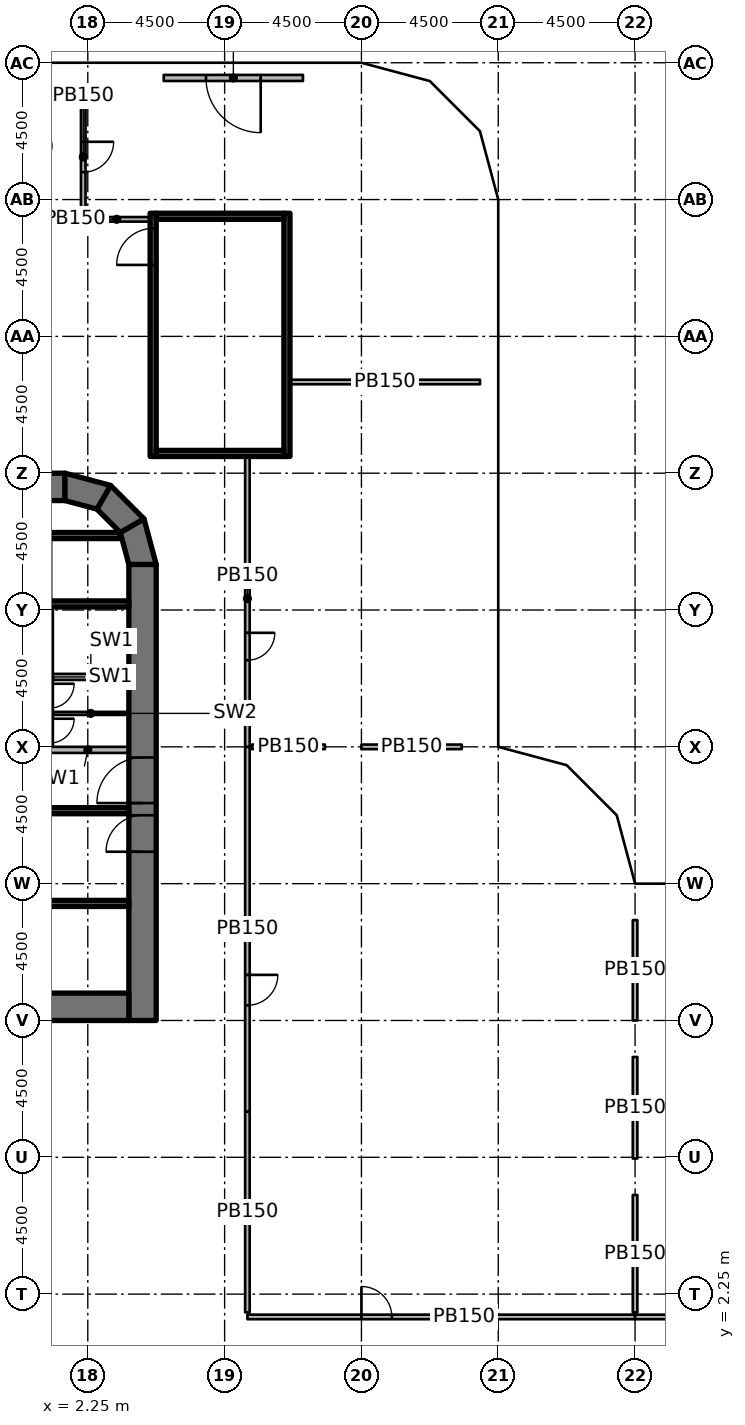
"""IFC4 building model, lengths in metres.
Left out: names, types, materials, properties, quantities, classifications, styles, units other than length and angle.
Written with IfcOpenShell. Run it as: python <this file> out.ifc"""

import sys

from ifc_helpers import new_model, si_unit, direction, frame, frame_2d, origin, origin_2d, place, context, subcontext, project, spatial, polyline, rectangle, outline, extrude, element, fill, save


model = new_model("IFC4")
c1 = context("Model", 3, precision=1e-05, world=origin(), true_north=direction((0.0, 1.0)))
c2 = subcontext(c1, "Body", "Model", "MODEL_VIEW")
j1 = project(units=[si_unit("LENGTHUNIT", "METRE"), si_unit("PLANEANGLEUNIT", "RADIAN")], contexts=[c1])
p1 = place(None, origin())
s1 = spatial("IfcSite", under=j1, at=p1, CompositionType="ELEMENT")
p2 = place(p1, origin())
s2 = spatial("IfcBuilding", under=s1, at=p2, CompositionType="ELEMENT")
p3 = place(p2, frame((0.0, 0.0, 17.0)))
s3 = spatial("IfcBuildingStorey", under=s2, at=p3, CompositionType="ELEMENT", Elevation=17.0)
for number, where, z_axis, x_axis in (
    (1, (2.25, 33.11, 0.0), (0.0, 0.0, 1.0), (1.0, 0.0, 0.0)),
    (2, (2.25, 42.15, 0.0), (0.0, 0.0, 1.0), (1.0, 0.0, 0.0)),
    (3, (6.25, 6.25, 0.0), (0.0, 0.0, 1.0), (1.0, 0.0, 0.0)),
    (4, (6.25, 10.75, 0.0), (0.0, 0.0, 1.0), (1.0, 0.0, 0.0)),
    (5, (6.25, 15.75, 0.0), (0.0, 0.0, 1.0), (1.0, 0.0, 0.0)),
    (6, (6.25, 20.25, 0.0), (0.0, 0.0, 1.0), (1.0, 0.0, 0.0)),
    (7, (6.25, 24.65, 0.0), (0.0, 0.0, 1.0), (1.0, 0.0, 0.0)),
    (8, (6.25, 26.7, 0.0), (0.0, 0.0, 1.0), (1.0, 0.0, 0.0)),
    (9, (10.75, 6.25, 0.0), (0.0, 0.0, 1.0), (1.0, 0.0, 0.0)),
    (10, (10.65, 15.15, 0.0), (0.0, 0.0, 1.0), (1.0, 0.0, 0.0)),
    (11, (10.65, 20.25, 0.0), (0.0, 0.0, 1.0), (1.0, 0.0, 0.0)),
    (12, (10.47, 33.75, 0.0), (0.0, 0.0, 1.0), (1.0, 0.0, 0.0)),
    (13, (15.75, 6.25, 0.0), (0.0, 0.0, 1.0), (1.0, 0.0, 0.0)),
    (14, (15.15, 10.65, 0.0), (0.0, 0.0, 1.0), (1.0, 0.0, 0.0)),
    (15, (15.15, 19.65, 0.0), (0.0, 0.0, 1.0), (1.0, 0.0, 0.0)),
    (16, (15.15, 29.25, 0.0), (0.0, 0.0, 1.0), (1.0, 0.0, 0.0)),
    (17, (20.25, 6.11, 0.0), (0.0, 0.0, 1.0), (1.0, 0.0, 0.0)),
    (18, (20.25, 10.65, 0.0), (0.0, 0.0, 1.0), (1.0, 0.0, 0.0)),
    (19, (19.65, 15.15, 0.0), (0.0, 0.0, 1.0), (1.0, 0.0, 0.0)),
):
    element("IfcColumn", number, at=place(p3, frame(where, z_axis=z_axis, x_axis=x_axis)), inside=s3, PredefinedType="COLUMN", context=c2, shape_type="SweptSolid", body=[
        extrude(rectangle(XDim=1.2, YDim=1.2, at=origin_2d()), origin(), (0.0, 0.0, 1.0), 4.55),
    ])
p4 = place(p3, frame((4.05, 11.25, 0.0), z_axis=(0.0, 0.0, 1.0), x_axis=(0.0, 1.0, 0.0)))
e20 = element("IfcWall", 20, at=p4, inside=s3, PredefinedType="SHEAR", context=c2, shape_type="SweptSolid", body=[
    extrude(rectangle(XDim=15.0, YDim=0.9, at=frame_2d((7.5, 0.0))), origin(), (0.0, 0.0, 1.0), 5.0),
])
p5 = place(p4, frame((7.15, 0.0, 0.0)))
e21 = element("IfcOpeningElement", 21, at=p5, cuts=e20, PredefinedType="OPENING", context=c2, shape_type="SweptSolid", body=[
    extrude(rectangle(XDim=1.5, YDim=2.3, at=frame_2d((0.75, 1.15))), frame((0.0, 0.46, 0.0), z_axis=(0.0, -1.0, 0.0), x_axis=(1.0, 0.0, 0.0)), (0.0, 0.0, 1.0), 0.92),
])
p6 = place(p4, frame((5.55, 0.0, 0.0)))
e22 = element("IfcOpeningElement", 22, at=p6, cuts=e20, PredefinedType="OPENING", context=c2, shape_type="SweptSolid", body=[
    extrude(rectangle(XDim=1.2, YDim=2.1, at=frame_2d((0.6, 1.05))), frame((0.0, 0.46, 0.0), z_axis=(0.0, -1.0, 0.0), x_axis=(1.0, 0.0, 0.0)), (0.0, 0.0, 1.0), 0.92),
])
p7 = place(p3, frame((-3.6, 11.7, 0.0), z_axis=(0.0, 0.0, 1.0), x_axis=(1.0, 0.0, 0.0)))
e23 = element("IfcWall", 23, at=p7, inside=s3, PredefinedType="SHEAR", context=c2, shape_type="SweptSolid", body=[
    extrude(rectangle(XDim=7.2, YDim=0.9, at=frame_2d((3.6, 0.0))), origin(), (0.0, 0.0, 1.0), 5.0),
])
p8 = place(p3, frame((-1.5, 28.8, 0.0), z_axis=(0.0, 0.0, 1.0), x_axis=(1.0, 0.0, 0.0)))
e24 = element("IfcWall", 24, at=p8, inside=s3, PredefinedType="SHEAR", context=c2, shape_type="SweptSolid", body=[
    extrude(rectangle(XDim=3.0, YDim=0.9, at=frame_2d((1.5, 0.0))), origin(), (0.0, 0.0, 1.0), 5.0),
])
p9 = place(p3, origin())
e25 = element("IfcWall", 25, at=p9, inside=s3, PredefinedType="SHEAR", context=c2, shape_type="SweptSolid", body=[
    extrude(outline(polyline([(4.5, 26.25), (4.098, 27.75), (3.319, 27.3), (3.6, 26.25), (4.5, 26.25)])), origin(), (0.0, 0.0, 1.0), 5.0),
])
p10 = place(p3, origin())
e26 = element("IfcWall", 26, at=p10, inside=s3, PredefinedType="SHEAR", context=c2, shape_type="SweptSolid", body=[
    extrude(outline(polyline([(4.098, 27.75), (3.0, 28.848), (2.55, 28.069), (3.319, 27.3), (4.098, 27.75)])), origin(), (0.0, 0.0, 1.0), 5.0),
])
p11 = place(p3, origin())
e27 = element("IfcWall", 27, at=p11, inside=s3, PredefinedType="SHEAR", context=c2, shape_type="SweptSolid", body=[
    extrude(outline(polyline([(3.0, 28.848), (1.5, 29.25), (1.5, 28.35), (2.55, 28.069), (3.0, 28.848)])), origin(), (0.0, 0.0, 1.0), 5.0),
])
p12 = place(p3, frame((9.327, 42.25, 0.0), z_axis=(0.0, 0.0, 1.0), x_axis=(-1.0, 0.0, 0.0)))
e28 = element("IfcWall", 28, at=p12, inside=s3, PredefinedType="SOLIDWALL", context=c2, shape_type="SweptSolid", body=[
    extrude(rectangle(XDim=4.58, YDim=0.2, at=frame_2d((2.29, 0.0))), origin(), (0.0, 0.0, 1.0), 4.55),
])
p13 = place(p12, frame((1.39, 0.0, 0.0)))
e29 = element("IfcOpeningElement", 29, at=p13, cuts=e28, PredefinedType="OPENING", context=c2, shape_type="SweptSolid", body=[
    extrude(rectangle(XDim=1.8, YDim=2.4, at=frame_2d((0.9, 1.2))), frame((0.0, 0.11, 0.0), z_axis=(0.0, -1.0, 0.0), x_axis=(1.0, 0.0, 0.0)), (0.0, 0.0, 1.0), 0.22),
])
p14 = place(p3, frame((-3.6, 24.95, 0.0), z_axis=(0.0, 0.0, 1.0), x_axis=(1.0, 0.0, 0.0)))
e30 = element("IfcWall", 30, at=p14, inside=s3, PredefinedType="SHEAR", context=c2, shape_type="SweptSolid", body=[
    extrude(rectangle(XDim=7.2, YDim=0.2, at=frame_2d((3.6, 0.0))), origin(), (0.0, 0.0, 1.0), 4.55),
])
p15 = place(p3, origin())
e31 = element("IfcWall", 31, at=p15, inside=s3, PredefinedType="SHEAR", context=c2, shape_type="SweptSolid", body=[
    extrude(outline(polyline([(1.0, 27.1), (3.341, 27.1), (3.291, 27.284), (3.275, 27.3), (1.0, 27.3), (1.0, 27.1)])), origin(), (0.0, 0.0, 1.0), 4.55),
])
for number, where, z_axis, x_axis in (
    (32, (-3.6, 18.15, 0.0), (0.0, 0.0, 1.0), (1.0, 0.0, 0.0)),
    (33, (-3.6, 15.1, 0.0), (0.0, 0.0, 1.0), (1.0, 0.0, 0.0)),
):
    element("IfcWall", number, at=place(p3, frame(where, z_axis=z_axis, x_axis=x_axis)), inside=s3, PredefinedType="SHEAR", context=c2, shape_type="SweptSolid", body=[
        extrude(rectangle(XDim=7.2, YDim=0.2, at=frame_2d((3.6, 0.0))), origin(), (0.0, 0.0, 1.0), 4.55),
    ])
p16 = place(p3, frame((0.9, 20.15, 0.0), z_axis=(0.0, 0.0, 1.0), x_axis=(1.0, 0.0, 0.0)))
e34 = element("IfcWall", 34, at=p16, inside=s3, PredefinedType="PARTITIONING", context=c2, shape_type="SweptSolid", body=[
    extrude(rectangle(XDim=2.7, YDim=0.2, at=frame_2d((1.35, 0.0))), origin(), (0.0, 0.0, 1.0), 4.55),
])
p17 = place(p3, frame((1.1, 22.55, 0.0), z_axis=(0.0, 0.0, 1.0), x_axis=(1.0, 0.0, 0.0)))
e35 = element("IfcWall", 35, at=p17, inside=s3, PredefinedType="PARTITIONING", context=c2, shape_type="SweptSolid", body=[
    extrude(rectangle(XDim=2.5, YDim=0.2, at=frame_2d((1.25, 0.0))), origin(), (0.0, 0.0, 1.0), 4.55),
])
p18 = place(p3, frame((1.1, 21.35, 0.0), z_axis=(0.0, 0.0, 1.0), x_axis=(1.0, 0.0, 0.0)))
e36 = element("IfcWall", 36, at=p18, inside=s3, PredefinedType="PARTITIONING", context=c2, shape_type="SweptSolid", body=[
    extrude(rectangle(XDim=2.5, YDim=0.1, at=frame_2d((1.25, 0.0))), origin(), (0.0, 0.0, 1.0), 4.55),
])
p19 = place(p3, frame((4.4, 29.8, 0.0), z_axis=(0.0, 0.0, 1.0), x_axis=(0.0, 1.0, 0.0)))
e37 = element("IfcWall", 37, at=p19, inside=s3, PredefinedType="SHEAR", context=c2, shape_type="SweptSolid", body=[
    extrude(rectangle(XDim=8.0, YDim=0.2, at=frame_2d((4.0, 0.0))), origin(), (0.0, 0.0, 1.0), 4.55),
])
p20 = place(p19, frame((6.3, 0.0, 0.0)))
e38 = element("IfcOpeningElement", 38, at=p20, cuts=e37, PredefinedType="OPENING", context=c2, shape_type="SweptSolid", body=[
    extrude(rectangle(XDim=1.2, YDim=2.1, at=frame_2d((0.6, 1.05))), frame((0.0, 0.11, 0.0), z_axis=(0.0, -1.0, 0.0), x_axis=(1.0, 0.0, 0.0)), (0.0, 0.0, 1.0), 0.22),
])
p21 = place(p3, frame((8.8, 29.8, 0.0), z_axis=(0.0, 0.0, 1.0), x_axis=(0.0, 1.0, 0.0)))
e39 = element("IfcWall", 39, at=p21, inside=s3, PredefinedType="SHEAR", context=c2, shape_type="SweptSolid", body=[
    extrude(rectangle(XDim=8.0, YDim=0.2, at=frame_2d((4.0, 0.0))), origin(), (0.0, 0.0, 1.0), 4.55),
])
for number, where, z_axis, x_axis in (
    (40, (4.5, 29.9, 0.0), (0.0, 0.0, 1.0), (1.0, 0.0, 0.0)),
    (41, (4.5, 37.7, 0.0), (0.0, 0.0, 1.0), (1.0, 0.0, 0.0)),
):
    element("IfcWall", number, at=place(p3, frame(where, z_axis=z_axis, x_axis=x_axis)), inside=s3, PredefinedType="SHEAR", context=c2, shape_type="SweptSolid", body=[
        extrude(rectangle(XDim=4.2, YDim=0.2, at=frame_2d((2.1, 0.0))), origin(), (0.0, 0.0, 1.0), 4.55),
    ])
p22 = place(p3, frame((2.1, 37.6, 0.0), z_axis=(0.0, 0.0, 1.0), x_axis=(1.0, 0.0, 0.0)))
e42 = element("IfcWall", 42, at=p22, inside=s3, PredefinedType="PARTITIONING", context=c2, shape_type="SweptSolid", body=[
    extrude(rectangle(XDim=2.2, YDim=0.15, at=frame_2d((1.1, 0.0))), origin(), (0.0, 0.0, 1.0), 4.55),
])
p23 = place(p3, frame((7.5, 20.25, 0.0), z_axis=(0.0, 0.0, 1.0), x_axis=(0.0, -1.0, 0.0)))
e43 = element("IfcWall", 43, at=p23, inside=s3, PredefinedType="PARTITIONING", context=c2, shape_type="SweptSolid", body=[
    extrude(rectangle(XDim=12.0, YDim=0.15, at=frame_2d((6.0, 0.0))), origin(), (0.0, 0.0, 1.0), 4.55),
])
p24 = place(p23, frame((7.5, 0.0, 0.0)))
e44 = element("IfcOpeningElement", 44, at=p24, cuts=e43, PredefinedType="OPENING", context=c2, shape_type="SweptSolid", body=[
    extrude(rectangle(XDim=1.0, YDim=2.1, at=frame_2d((0.5, 1.05))), frame((0.0, 0.085, 0.0), z_axis=(0.0, -1.0, 0.0), x_axis=(1.0, 0.0, 0.0)), (0.0, 0.0, 1.0), 0.17),
])
p25 = place(p3, frame((7.5, 30.0, 0.0), z_axis=(0.0, 0.0, 1.0), x_axis=(0.0, -1.0, 0.0)))
e45 = element("IfcWall", 45, at=p25, inside=s3, PredefinedType="PARTITIONING", context=c2, shape_type="SweptSolid", body=[
    extrude(rectangle(XDim=9.75, YDim=0.15, at=frame_2d((4.875, 0.0))), origin(), (0.0, 0.0, 1.0), 4.55),
])
p26 = place(p25, frame((6.0, 0.0, 0.0)))
e46 = element("IfcOpeningElement", 46, at=p26, cuts=e45, PredefinedType="OPENING", context=c2, shape_type="SweptSolid", body=[
    extrude(rectangle(XDim=0.9, YDim=2.1, at=frame_2d((0.45, 1.05))), frame((0.0, 0.085, 0.0), z_axis=(0.0, -1.0, 0.0), x_axis=(1.0, 0.0, 0.0)), (0.0, 0.0, 1.0), 0.17),
])
p27 = place(p3, frame((7.5, 1.5, 0.0), z_axis=(0.0, 0.0, 1.0), x_axis=(1.0, 0.0, 0.0)))
e47 = element("IfcWall", 47, at=p27, inside=s3, PredefinedType="PARTITIONING", context=c2, shape_type="SweptSolid", body=[
    extrude(rectangle(XDim=12.75, YDim=0.15, at=frame_2d((6.375, 0.0))), origin(), (0.0, 0.0, 1.0), 4.55),
])
p28 = place(p27, frame((3.75, 0.0, 0.0)))
e48 = element("IfcOpeningElement", 48, at=p28, cuts=e47, PredefinedType="OPENING", context=c2, shape_type="SweptSolid", body=[
    extrude(rectangle(XDim=1.0, YDim=2.1, at=frame_2d((0.5, 1.05))), frame((0.0, 0.085, 0.0), z_axis=(0.0, -1.0, 0.0), x_axis=(1.0, 0.0, 0.0)), (0.0, 0.0, 1.0), 0.17),
])
p29 = place(p3, frame((20.25, 1.5, 0.0), z_axis=(0.0, 0.0, 1.0), x_axis=(1.0, 0.0, 0.0)))
e49 = element("IfcWall", 49, at=p29, inside=s3, PredefinedType="PARTITIONING", context=c2, shape_type="SweptSolid", body=[
    extrude(rectangle(XDim=21.9, YDim=0.15, at=frame_2d((10.95, 0.0))), origin(), (0.0, 0.0, 1.0), 4.55),
])
p30 = place(p29, frame((10.8, 0.0, 0.0)))
e50 = element("IfcOpeningElement", 50, at=p30, cuts=e49, PredefinedType="OPENING", context=c2, shape_type="SweptSolid", body=[
    extrude(rectangle(XDim=0.9, YDim=2.1, at=frame_2d((0.45, 1.05))), frame((0.0, 0.085, 0.0), z_axis=(0.0, -1.0, 0.0), x_axis=(1.0, 0.0, 0.0)), (0.0, 0.0, 1.0), 0.17),
])
p31 = place(p3, frame((2.1, 41.55, 0.0), z_axis=(0.0, 0.0, 1.0), x_axis=(0.0, -1.0, 0.0)))
e51 = element("IfcWall", 51, at=p31, inside=s3, PredefinedType="PARTITIONING", context=c2, shape_type="SweptSolid", body=[
    extrude(rectangle(XDim=3.8, YDim=0.15, at=frame_2d((1.9, 0.0))), origin(), (0.0, 0.0, 1.0), 4.55),
])
p32 = place(p31, frame((1.4, 0.0, 0.0)))
e52 = element("IfcOpeningElement", 52, at=p32, cuts=e51, PredefinedType="OPENING", context=c2, shape_type="SweptSolid", body=[
    extrude(rectangle(XDim=1.0, YDim=2.1, at=frame_2d((0.5, 1.05))), frame((0.0, 0.085, 0.0), z_axis=(0.0, -1.0, 0.0), x_axis=(1.0, 0.0, 0.0)), (0.0, 0.0, 1.0), 0.17),
])
p33 = place(p3, frame((20.25, 14.55, 0.0), z_axis=(0.0, 0.0, 1.0), x_axis=(0.0, -1.0, 0.0)))
e53 = element("IfcWall", 53, at=p33, inside=s3, PredefinedType="PARTITIONING", context=c2, shape_type="SweptSolid", body=[
    extrude(rectangle(XDim=3.3, YDim=0.15, at=frame_2d((1.65, 0.0))), origin(), (0.0, 0.0, 1.0), 4.55),
])
p34 = place(p3, frame((20.25, 10.05, 0.0), z_axis=(0.0, 0.0, 1.0), x_axis=(0.0, -1.0, 0.0)))
e54 = element("IfcWall", 54, at=p34, inside=s3, PredefinedType="PARTITIONING", context=c2, shape_type="SweptSolid", body=[
    extrude(rectangle(XDim=3.34, YDim=0.15, at=frame_2d((1.67, 0.0))), origin(), (0.0, 0.0, 1.0), 4.55),
])
p35 = place(p3, frame((20.25, 5.51, 0.0), z_axis=(0.0, 0.0, 1.0), x_axis=(0.0, -1.0, 0.0)))
e55 = element("IfcWall", 55, at=p35, inside=s3, PredefinedType="PARTITIONING", context=c2, shape_type="SweptSolid", body=[
    extrude(rectangle(XDim=3.86, YDim=0.15, at=frame_2d((1.93, 0.0))), origin(), (0.0, 0.0, 1.0), 4.55),
])
p36 = place(p3, frame((7.65, 20.25, 0.0), z_axis=(0.0, 0.0, 1.0), x_axis=(1.0, 0.0, 0.0)))
e56 = element("IfcWall", 56, at=p36, inside=s3, PredefinedType="PARTITIONING", context=c2, shape_type="SweptSolid", body=[
    extrude(rectangle(XDim=2.4, YDim=0.15, at=frame_2d((1.2, 0.0))), origin(), (0.0, 0.0, 1.0), 4.55),
])
p37 = place(p3, frame((11.25, 20.25, 0.0), z_axis=(0.0, 0.0, 1.0), x_axis=(1.0, 0.0, 0.0)))
e57 = element("IfcWall", 57, at=p37, inside=s3, PredefinedType="PARTITIONING", context=c2, shape_type="SweptSolid", body=[
    extrude(rectangle(XDim=3.3, YDim=0.15, at=frame_2d((1.65, 0.0))), origin(), (0.0, 0.0, 1.0), 4.55),
])
p38 = place(p3, frame((7.5, 1.65, 0.0), z_axis=(0.0, 0.0, 1.0), x_axis=(0.0, 1.0, 0.0)))
e58 = element("IfcWall", 58, at=p38, inside=s3, PredefinedType="PARTITIONING", context=c2, shape_type="SweptSolid", body=[
    extrude(rectangle(XDim=6.6, YDim=0.15, at=frame_2d((3.3, 0.0))), origin(), (0.0, 0.0, 1.0), 4.55),
])
p39 = place(p3, frame((8.9, 32.25, 0.0), z_axis=(0.0, 0.0, 1.0), x_axis=(1.0, 0.0, 0.0)))
e59 = element("IfcWall", 59, at=p39, inside=s3, PredefinedType="PARTITIONING", context=c2, shape_type="SweptSolid", body=[
    extrude(rectangle(XDim=6.25, YDim=0.15, at=frame_2d((3.125, 0.0))), origin(), (0.0, 0.0, 1.0), 4.55),
])
p40 = place(p13, origin())
e60 = element("IfcDoor", 60, at=p40, inside=s3, OperationType="SINGLE_SWING_LEFT", PredefinedType="DOOR", context=c2, shape_type="SweptSolid", body=[
    extrude(rectangle(XDim=1.8, YDim=2.4, at=frame_2d((0.9, 1.2))), frame((0.0, 0.025, 0.0), z_axis=(0.0, -1.0, 0.0), x_axis=(1.0, 0.0, 0.0)), (0.0, 0.0, 1.0), 0.05),
])
fill(e29, e60)
p41 = place(p5, origin())
e61 = element("IfcDoor", 61, at=p41, inside=s3, OperationType="DOUBLE_DOOR_SINGLE_SWING", PredefinedType="DOOR", context=c2, shape_type="SweptSolid", body=[
    extrude(rectangle(XDim=1.5, YDim=2.3, at=frame_2d((0.75, 1.15))), frame((0.0, 0.025, 0.0), z_axis=(0.0, -1.0, 0.0), x_axis=(1.0, 0.0, 0.0)), (0.0, 0.0, 1.0), 0.05),
])
fill(e21, e61)
p42 = place(p6, origin())
e62 = element("IfcDoor", 62, at=p42, inside=s3, OperationType="SINGLE_SWING_LEFT", PredefinedType="DOOR", context=c2, shape_type="SweptSolid", body=[
    extrude(rectangle(XDim=1.2, YDim=2.1, at=frame_2d((0.6, 1.05))), frame((0.0, 0.025, 0.0), z_axis=(0.0, -1.0, 0.0), x_axis=(1.0, 0.0, 0.0)), (0.0, 0.0, 1.0), 0.05),
])
fill(e22, e62)
p43 = place(p20, origin())
e63 = element("IfcDoor", 63, at=p43, inside=s3, OperationType="SINGLE_SWING_LEFT", PredefinedType="DOOR", context=c2, shape_type="SweptSolid", body=[
    extrude(rectangle(XDim=1.2, YDim=2.1, at=frame_2d((0.6, 1.05))), frame((0.0, 0.025, 0.0), z_axis=(0.0, -1.0, 0.0), x_axis=(1.0, 0.0, 0.0)), (0.0, 0.0, 1.0), 0.05),
])
fill(e38, e63)
p44 = place(p24, origin())
e64 = element("IfcDoor", 64, at=p44, inside=s3, OperationType="SINGLE_SWING_LEFT", PredefinedType="DOOR", context=c2, shape_type="SweptSolid", body=[
    extrude(rectangle(XDim=1.0, YDim=2.1, at=frame_2d((0.5, 1.05))), frame((0.0, 0.025, 0.0), z_axis=(0.0, -1.0, 0.0), x_axis=(1.0, 0.0, 0.0)), (0.0, 0.0, 1.0), 0.05),
])
fill(e44, e64)
p45 = place(p26, origin())
e65 = element("IfcDoor", 65, at=p45, inside=s3, OperationType="SINGLE_SWING_LEFT", PredefinedType="DOOR", context=c2, shape_type="SweptSolid", body=[
    extrude(rectangle(XDim=0.9, YDim=2.1, at=frame_2d((0.45, 1.05))), frame((0.0, 0.025, 0.0), z_axis=(0.0, -1.0, 0.0), x_axis=(1.0, 0.0, 0.0)), (0.0, 0.0, 1.0), 0.05),
])
fill(e46, e65)
p46 = place(p28, origin())
e66 = element("IfcDoor", 66, at=p46, inside=s3, OperationType="SINGLE_SWING_LEFT", PredefinedType="DOOR", context=c2, shape_type="SweptSolid", body=[
    extrude(rectangle(XDim=1.0, YDim=2.1, at=frame_2d((0.5, 1.05))), frame((0.0, 0.025, 0.0), z_axis=(0.0, -1.0, 0.0), x_axis=(1.0, 0.0, 0.0)), (0.0, 0.0, 1.0), 0.05),
])
fill(e48, e66)
p47 = place(p32, origin())
e67 = element("IfcDoor", 67, at=p47, inside=s3, OperationType="SINGLE_SWING_LEFT", PredefinedType="DOOR", context=c2, shape_type="SweptSolid", body=[
    extrude(rectangle(XDim=1.0, YDim=2.1, at=frame_2d((0.5, 1.05))), frame((0.0, 0.025, 0.0), z_axis=(0.0, -1.0, 0.0), x_axis=(1.0, 0.0, 0.0)), (0.0, 0.0, 1.0), 0.05),
])
fill(e52, e67)
save(model, sys.argv[1])
